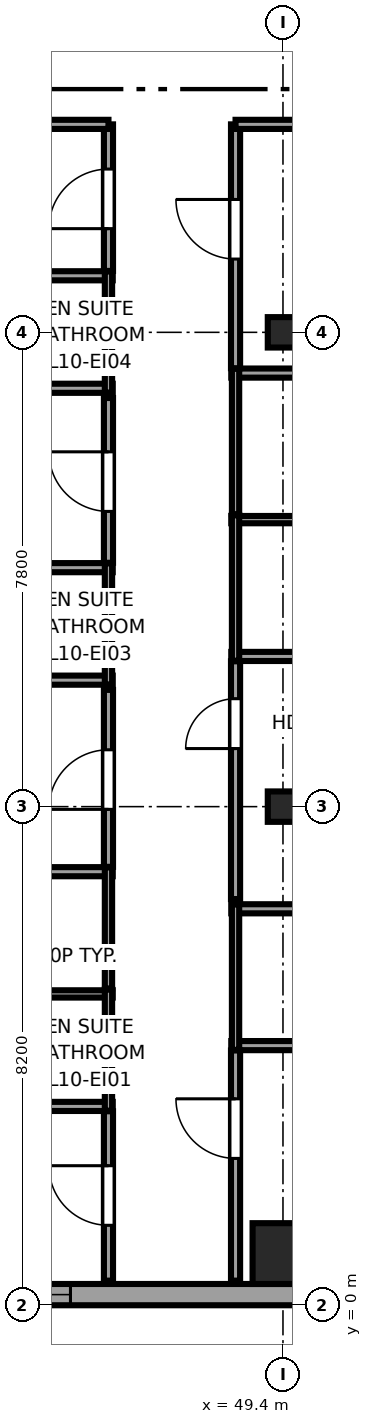
"""IFC4 building model, lengths in metres.
Left out: names, types, materials, properties, quantities, classifications, styles, units other than length and angle.
Written with IfcOpenShell. Run it as: python <this file> out.ifc"""

import sys

from ifc_helpers import new_model, si_unit, direction, frame, frame_2d, origin, origin_2d, place, context, subcontext, project, spatial, rectangle, i_section, extrude, source, transform, mapped, element, fill, save


model = new_model("IFC4")
c1 = context("Model", 3, precision=1e-05, world=origin(), true_north=direction((0.0, 1.0)))
c2 = subcontext(c1, "Body", "Model", "MODEL_VIEW")
j1 = project(units=[si_unit("LENGTHUNIT", "METRE"), si_unit("PLANEANGLEUNIT", "RADIAN")], contexts=[c1])
p1 = place(None, origin())
s1 = spatial("IfcSite", under=j1, at=p1, CompositionType="ELEMENT")
p2 = place(p1, origin())
s2 = spatial("IfcBuilding", under=s1, at=p2, CompositionType="ELEMENT")
p3 = place(p2, frame((0.0, 0.0, 46.2)))
s3 = spatial("IfcBuildingStorey", under=s2, at=p3, CompositionType="ELEMENT", Elevation=46.2)
m1 = source(origin(), c2, "Body", "SweptSolid", [
    extrude(rectangle(XDim=1.0, YDim=1.0, at=origin_2d()), origin(), (0.0, 0.0, 1.0), 3.55),
])
p4 = place(p3, frame((49.4, 0.85, 0.0), z_axis=(0.0, 0.0, 1.0), x_axis=(1.0, 0.0, 0.0)))
e1 = element("IfcColumn", 1, at=p4, inside=s3, PredefinedType="COLUMN", context=c2, shape_type="MappedRepresentation", body=[
    mapped(m1, transform((0.0, 0.0, 0.0), x_axis=(1.0, 0.0, 0.0), y_axis=(0.0, 1.0, 0.0), z_axis=(0.0, 0.0, 1.0), scale=1.0)),
])
m2 = source(origin(), c2, "Body", "SweptSolid", [
    extrude(i_section(OverallWidth=0.5, OverallDepth=0.5, WebThickness=0.028, FlangeThickness=0.045, at=origin_2d()), origin(), (0.0, 0.0, 1.0), 3.55),
])
for number, where, z_axis, x_axis in (
    (2, (49.4, 8.2, 0.0), (0.0, 0.0, 1.0), (1.0, 0.0, 0.0)),
    (3, (49.4, 16.0, 0.0), (0.0, 0.0, 1.0), (1.0, 0.0, 0.0)),
):
    element("IfcColumn", number, at=place(p3, frame(where, z_axis=z_axis, x_axis=x_axis)), inside=s3, PredefinedType="COLUMN", context=c2, shape_type="MappedRepresentation", body=[
        mapped(m2, transform((0.0, 0.0, 0.0), x_axis=(1.0, 0.0, 0.0), y_axis=(0.0, 1.0, 0.0), z_axis=(0.0, 0.0, 1.0), scale=1.0)),
    ])
p5 = place(p3, frame((34.375, 0.175, 0.0), z_axis=(0.0, 0.0, 1.0), x_axis=(1.0, 0.0, 0.0)))
e4 = element("IfcWall", 4, at=p5, inside=s3, PredefinedType="SOLIDWALL", context=c2, shape_type="SweptSolid", body=[
    extrude(rectangle(XDim=18.008, YDim=0.35, at=frame_2d((9.004, 0.0))), origin(), (0.0, 0.0, 1.0), 3.37),
])
p6 = place(p5, frame((1.726, 0.0, 0.68)))
e5 = element("IfcOpeningElement", 5, at=p6, cuts=e4, PredefinedType="OPENING", context=c2, shape_type="SweptSolid", body=[
    extrude(rectangle(XDim=1.95, YDim=1.82, at=frame_2d((0.975, 0.91))), frame((0.0, 0.185, 0.0), z_axis=(0.0, -1.0, 0.0), x_axis=(1.0, 0.0, 0.0)), (0.0, 0.0, 1.0), 0.37),
])
p7 = place(p5, frame((9.58, 0.0, 0.68)))
e6 = element("IfcOpeningElement", 6, at=p7, cuts=e4, PredefinedType="OPENING", context=c2, shape_type="SweptSolid", body=[
    extrude(rectangle(XDim=1.95, YDim=1.82, at=frame_2d((0.975, 0.91))), frame((0.0, 0.185, 0.0), z_axis=(0.0, -1.0, 0.0), x_axis=(1.0, 0.0, 0.0)), (0.0, 0.0, 1.0), 0.37),
])
p8 = place(p5, frame((15.725, 0.0, 0.62)))
e7 = element("IfcOpeningElement", 7, at=p8, cuts=e4, PredefinedType="OPENING", context=c2, shape_type="SweptSolid", body=[
    extrude(rectangle(XDim=1.5, YDim=1.55, at=frame_2d((0.75, 0.775))), frame((0.0, 0.185, 0.0), z_axis=(0.0, -1.0, 0.0), x_axis=(1.0, 0.0, 0.0)), (0.0, 0.0, 1.0), 0.37),
])
p9 = place(p3, frame((44.01, 3.27, 0.0), z_axis=(0.0, 0.0, 1.0), x_axis=(1.0, 0.0, 0.0)))
e8 = element("IfcWall", 8, at=p9, inside=s3, PredefinedType="PARTITIONING", context=c2, shape_type="SweptSolid", body=[
    extrude(rectangle(XDim=2.59, YDim=0.15, at=frame_2d((1.295, 0.0))), origin(), (0.0, 0.0, 1.0), 3.37),
])
p10 = place(p3, frame((44.01, 5.12, 0.0), z_axis=(0.0, 0.0, 1.0), x_axis=(1.0, 0.0, 0.0)))
e9 = element("IfcWall", 9, at=p10, inside=s3, PredefinedType="PLUMBINGWALL", context=c2, shape_type="SweptSolid", body=[
    extrude(rectangle(XDim=2.59, YDim=0.12, at=frame_2d((1.295, 0.0))), origin(), (0.0, 0.0, 1.0), 3.37),
])
p11 = place(p3, frame((46.53, 3.2, 0.0), z_axis=(0.0, 0.0, 1.0), x_axis=(0.0, 1.0, 0.0)))
e10 = element("IfcWall", 10, at=p11, inside=s3, PredefinedType="PLUMBINGWALL", context=c2, shape_type="SweptSolid", body=[
    extrude(rectangle(XDim=1.99, YDim=0.12, at=frame_2d((0.995, 0.0))), origin(), (0.0, 0.0, 1.0), 3.37),
])
p12 = place(p3, frame((44.01, 7.13, 0.0), z_axis=(0.0, 0.0, 1.0), x_axis=(1.0, 0.0, 0.0)))
e11 = element("IfcWall", 11, at=p12, inside=s3, PredefinedType="PARTITIONING", context=c2, shape_type="SweptSolid", body=[
    extrude(rectangle(XDim=2.59, YDim=0.15, at=frame_2d((1.295, 0.0))), origin(), (0.0, 0.0, 1.0), 3.37),
])
p13 = place(p3, frame((46.53, 5.21, 0.0), z_axis=(0.0, 0.0, 1.0), x_axis=(0.0, 1.0, 0.0)))
e12 = element("IfcWall", 12, at=p13, inside=s3, PredefinedType="PLUMBINGWALL", context=c2, shape_type="SweptSolid", body=[
    extrude(rectangle(XDim=1.99, YDim=0.12, at=frame_2d((0.995, 0.0))), origin(), (0.0, 0.0, 1.0), 3.37),
])
p14 = place(p3, frame((34.65, 10.28, 0.0), z_axis=(0.0, 0.0, 1.0), x_axis=(1.0, 0.0, 0.0)))
e13 = element("IfcWall", 13, at=p14, inside=s3, PredefinedType="PARTITIONING", context=c2, shape_type="SweptSolid", body=[
    extrude(rectangle(XDim=11.95, YDim=0.15, at=frame_2d((5.975, 0.0))), origin(), (0.0, 0.0, 1.0), 3.37),
])
p15 = place(p3, frame((44.01, 12.13, 0.0), z_axis=(0.0, 0.0, 1.0), x_axis=(1.0, 0.0, 0.0)))
e14 = element("IfcWall", 14, at=p15, inside=s3, PredefinedType="PARTITIONING", context=c2, shape_type="SweptSolid", body=[
    extrude(rectangle(XDim=2.59, YDim=0.15, at=frame_2d((1.295, 0.0))), origin(), (0.0, 0.0, 1.0), 3.37),
])
p16 = place(p3, frame((46.53, 10.21, 0.0), z_axis=(0.0, 0.0, 1.0), x_axis=(0.0, 1.0, 0.0)))
e15 = element("IfcWall", 15, at=p16, inside=s3, PredefinedType="PLUMBINGWALL", context=c2, shape_type="SweptSolid", body=[
    extrude(rectangle(XDim=1.99, YDim=0.12, at=frame_2d((0.995, 0.0))), origin(), (0.0, 0.0, 1.0), 3.37),
])
p17 = place(p3, frame((34.65, 15.08, 0.0), z_axis=(0.0, 0.0, 1.0), x_axis=(1.0, 0.0, 0.0)))
e16 = element("IfcWall", 16, at=p17, inside=s3, PredefinedType="PARTITIONING", context=c2, shape_type="SweptSolid", body=[
    extrude(rectangle(XDim=11.95, YDim=0.15, at=frame_2d((5.975, 0.0))), origin(), (0.0, 0.0, 1.0), 3.37),
])
p18 = place(p3, frame((44.01, 16.93, 0.0), z_axis=(0.0, 0.0, 1.0), x_axis=(1.0, 0.0, 0.0)))
e17 = element("IfcWall", 17, at=p18, inside=s3, PredefinedType="PARTITIONING", context=c2, shape_type="SweptSolid", body=[
    extrude(rectangle(XDim=2.59, YDim=0.15, at=frame_2d((1.295, 0.0))), origin(), (0.0, 0.0, 1.0), 3.37),
])
p19 = place(p3, frame((46.53, 15.01, 0.0), z_axis=(0.0, 0.0, 1.0), x_axis=(0.0, 1.0, 0.0)))
e18 = element("IfcWall", 18, at=p19, inside=s3, PredefinedType="PLUMBINGWALL", context=c2, shape_type="SweptSolid", body=[
    extrude(rectangle(XDim=1.99, YDim=0.12, at=frame_2d((0.995, 0.0))), origin(), (0.0, 0.0, 1.0), 3.37),
])
for number, where, z_axis, x_axis in (
    (19, (48.55, 4.27, 0.0), (0.0, 0.0, 1.0), (1.0, 0.0, 0.0)),
    (20, (48.55, 6.52, 0.0), (0.0, 0.0, 1.0), (1.0, 0.0, 0.0)),
):
    element("IfcWall", number, at=place(p3, frame(where, z_axis=z_axis, x_axis=x_axis)), inside=s3, PredefinedType="PARTITIONING", context=c2, shape_type="SweptSolid", body=[
        extrude(rectangle(XDim=2.59, YDim=0.15, at=frame_2d((1.295, 0.0))), origin(), (0.0, 0.0, 1.0), 3.37),
    ])
p20 = place(p3, frame((48.62, 4.2, 0.0), z_axis=(0.0, 0.0, 1.0), x_axis=(0.0, 1.0, 0.0)))
e21 = element("IfcWall", 21, at=p20, inside=s3, PredefinedType="PLUMBINGWALL", context=c2, shape_type="SweptSolid", body=[
    extrude(rectangle(XDim=2.39, YDim=0.12, at=frame_2d((1.195, 0.0))), origin(), (0.0, 0.0, 1.0), 3.37),
])
p21 = place(p3, frame((48.55, 10.67, 0.0), z_axis=(0.0, 0.0, 1.0), x_axis=(1.0, 0.0, 0.0)))
e22 = element("IfcWall", 22, at=p21, inside=s3, PredefinedType="PARTITIONING", context=c2, shape_type="SweptSolid", body=[
    extrude(rectangle(XDim=2.59, YDim=0.15, at=frame_2d((1.295, 0.0))), origin(), (0.0, 0.0, 1.0), 3.37),
])
p22 = place(p3, frame((48.55, 12.92, 0.0), z_axis=(0.0, 0.0, 1.0), x_axis=(1.0, 0.0, 0.0)))
e23 = element("IfcWall", 23, at=p22, inside=s3, PredefinedType="PLUMBINGWALL", context=c2, shape_type="SweptSolid", body=[
    extrude(rectangle(XDim=2.59, YDim=0.12, at=frame_2d((1.295, 0.0))), origin(), (0.0, 0.0, 1.0), 3.37),
])
p23 = place(p3, frame((48.62, 10.6, 0.0), z_axis=(0.0, 0.0, 1.0), x_axis=(0.0, 1.0, 0.0)))
e24 = element("IfcWall", 24, at=p23, inside=s3, PredefinedType="PLUMBINGWALL", context=c2, shape_type="SweptSolid", body=[
    extrude(rectangle(XDim=2.39, YDim=0.12, at=frame_2d((1.195, 0.0))), origin(), (0.0, 0.0, 1.0), 3.37),
])
p24 = place(p3, frame((48.55, 15.33, 0.0), z_axis=(0.0, 0.0, 1.0), x_axis=(1.0, 0.0, 0.0)))
e25 = element("IfcWall", 25, at=p24, inside=s3, PredefinedType="PARTITIONING", context=c2, shape_type="SweptSolid", body=[
    extrude(rectangle(XDim=2.59, YDim=0.15, at=frame_2d((1.295, 0.0))), origin(), (0.0, 0.0, 1.0), 3.37),
])
p25 = place(p3, frame((48.62, 13.01, 0.0), z_axis=(0.0, 0.0, 1.0), x_axis=(0.0, 1.0, 0.0)))
e26 = element("IfcWall", 26, at=p25, inside=s3, PredefinedType="PLUMBINGWALL", context=c2, shape_type="SweptSolid", body=[
    extrude(rectangle(XDim=2.39, YDim=0.12, at=frame_2d((1.195, 0.0))), origin(), (0.0, 0.0, 1.0), 3.37),
])
p26 = place(p3, frame((46.53, 0.405, 0.0), z_axis=(0.0, 0.0, 1.0), x_axis=(0.0, 1.0, 0.0)))
e27 = element("IfcWall", 27, at=p26, inside=s3, PredefinedType="PARTITIONING", context=c2, shape_type="SweptSolid", body=[
    extrude(rectangle(XDim=2.785, YDim=0.15, at=frame_2d((1.393, 0.0))), origin(), (0.0, 0.0, 1.0), 3.37),
])
p27 = place(p26, frame((0.91, 0.0, 0.0)))
e28 = element("IfcOpeningElement", 28, at=p27, cuts=e27, PredefinedType="OPENING", context=c2, shape_type="SweptSolid", body=[
    extrude(rectangle(XDim=0.98, YDim=2.12, at=frame_2d((0.49, 1.06))), frame((0.0, 0.085, 0.0), z_axis=(0.0, -1.0, 0.0), x_axis=(1.0, 0.0, 0.0)), (0.0, 0.0, 1.0), 0.17),
])
p28 = place(p3, frame((46.53, 7.21, 0.0), z_axis=(0.0, 0.0, 1.0), x_axis=(0.0, 1.0, 0.0)))
e29 = element("IfcWall", 29, at=p28, inside=s3, PredefinedType="PARTITIONING", context=c2, shape_type="SweptSolid", body=[
    extrude(rectangle(XDim=2.91, YDim=0.15, at=frame_2d((1.455, 0.0))), origin(), (0.0, 0.0, 1.0), 3.37),
])
p29 = place(p28, frame((0.945, 0.0, 0.0)))
e30 = element("IfcOpeningElement", 30, at=p29, cuts=e29, PredefinedType="OPENING", context=c2, shape_type="SweptSolid", body=[
    extrude(rectangle(XDim=0.98, YDim=2.12, at=frame_2d((0.49, 1.06))), frame((0.0, 0.085, 0.0), z_axis=(0.0, -1.0, 0.0), x_axis=(1.0, 0.0, 0.0)), (0.0, 0.0, 1.0), 0.17),
])
p30 = place(p3, frame((46.53, 12.21, 0.0), z_axis=(0.0, 0.0, 1.0), x_axis=(0.0, 1.0, 0.0)))
e31 = element("IfcWall", 31, at=p30, inside=s3, PredefinedType="PARTITIONING", context=c2, shape_type="SweptSolid", body=[
    extrude(rectangle(XDim=2.71, YDim=0.15, at=frame_2d((1.355, 0.0))), origin(), (0.0, 0.0, 1.0), 3.37),
])
p31 = place(p30, frame((0.845, 0.0, 0.0)))
e32 = element("IfcOpeningElement", 32, at=p31, cuts=e31, PredefinedType="OPENING", context=c2, shape_type="SweptSolid", body=[
    extrude(rectangle(XDim=0.98, YDim=2.12, at=frame_2d((0.49, 1.06))), frame((0.0, 0.085, 0.0), z_axis=(0.0, -1.0, 0.0), x_axis=(1.0, 0.0, 0.0)), (0.0, 0.0, 1.0), 0.17),
])
p32 = place(p3, frame((46.53, 17.01, 0.0), z_axis=(0.0, 0.0, 1.0), x_axis=(0.0, 1.0, 0.0)))
e33 = element("IfcWall", 33, at=p32, inside=s3, PredefinedType="PARTITIONING", context=c2, shape_type="SweptSolid", body=[
    extrude(rectangle(XDim=2.41, YDim=0.15, at=frame_2d((1.205, 0.0))), origin(), (0.0, 0.0, 1.0), 3.37),
])
p33 = place(p32, frame((0.695, 0.0, 0.0)))
e34 = element("IfcOpeningElement", 34, at=p33, cuts=e33, PredefinedType="OPENING", context=c2, shape_type="SweptSolid", body=[
    extrude(rectangle(XDim=0.98, YDim=2.12, at=frame_2d((0.49, 1.06))), frame((0.0, 0.085, 0.0), z_axis=(0.0, -1.0, 0.0), x_axis=(1.0, 0.0, 0.0)), (0.0, 0.0, 1.0), 0.17),
])
p34 = place(p3, frame((34.65, 19.42, 0.0), z_axis=(0.0, 0.0, 1.0), x_axis=(1.0, 0.0, 0.0)))
e35 = element("IfcWall", 35, at=p34, inside=s3, PredefinedType="PARTITIONING", context=c2, shape_type="SweptSolid", body=[
    extrude(rectangle(XDim=11.88, YDim=0.15, at=frame_2d((5.94, 0.0))), origin(), (0.0, 0.0, 1.0), 3.37),
])
p35 = place(p3, frame((48.62, 0.405, 0.0), z_axis=(0.0, 0.0, 1.0), x_axis=(0.0, 1.0, 0.0)))
e36 = element("IfcWall", 36, at=p35, inside=s3, PredefinedType="PARTITIONING", context=c2, shape_type="SweptSolid", body=[
    extrude(rectangle(XDim=3.785, YDim=0.15, at=frame_2d((1.893, 0.0))), origin(), (0.0, 0.0, 1.0), 3.37),
])
p36 = place(p35, frame((2.01, 0.0, 0.0)))
e37 = element("IfcOpeningElement", 37, at=p36, cuts=e36, PredefinedType="OPENING", context=c2, shape_type="SweptSolid", body=[
    extrude(rectangle(XDim=0.98, YDim=2.12, at=frame_2d((0.49, 1.06))), frame((0.0, 0.085, 0.0), z_axis=(0.0, -1.0, 0.0), x_axis=(1.0, 0.0, 0.0)), (0.0, 0.0, 1.0), 0.17),
])
p37 = place(p3, frame((48.62, 6.68, 0.0), z_axis=(0.0, 0.0, 1.0), x_axis=(0.0, 1.0, 0.0)))
e38 = element("IfcWall", 38, at=p37, inside=s3, PredefinedType="PARTITIONING", context=c2, shape_type="SweptSolid", body=[
    extrude(rectangle(XDim=3.91, YDim=0.15, at=frame_2d((1.955, 0.0))), origin(), (0.0, 0.0, 1.0), 3.37),
])
p38 = place(p37, frame((2.475, 0.0, 0.0)))
e39 = element("IfcOpeningElement", 39, at=p38, cuts=e38, PredefinedType="OPENING", context=c2, shape_type="SweptSolid", body=[
    extrude(rectangle(XDim=0.82, YDim=2.01, at=frame_2d((0.41, 1.005))), frame((0.0, 0.085, 0.0), z_axis=(0.0, -1.0, 0.0), x_axis=(1.0, 0.0, 0.0)), (0.0, 0.0, 1.0), 0.17),
])
p39 = place(p3, frame((48.62, 15.41, 0.0), z_axis=(0.0, 0.0, 1.0), x_axis=(0.0, 1.0, 0.0)))
e40 = element("IfcWall", 40, at=p39, inside=s3, PredefinedType="PARTITIONING", context=c2, shape_type="SweptSolid", body=[
    extrude(rectangle(XDim=4.01, YDim=0.15, at=frame_2d((2.005, 0.0))), origin(), (0.0, 0.0, 1.0), 3.37),
])
p40 = place(p39, frame((1.795, 0.0, 0.0)))
e41 = element("IfcOpeningElement", 41, at=p40, cuts=e40, PredefinedType="OPENING", context=c2, shape_type="SweptSolid", body=[
    extrude(rectangle(XDim=0.98, YDim=2.12, at=frame_2d((0.49, 1.06))), frame((0.0, 0.085, 0.0), z_axis=(0.0, -1.0, 0.0), x_axis=(1.0, 0.0, 0.0)), (0.0, 0.0, 1.0), 0.17),
])
p41 = place(p3, frame((48.62, 19.42, 0.0), z_axis=(0.0, 0.0, 1.0), x_axis=(1.0, 0.0, 0.0)))
e42 = element("IfcWall", 42, at=p41, inside=s3, PredefinedType="PARTITIONING", context=c2, shape_type="SweptSolid", body=[
    extrude(rectangle(XDim=7.975, YDim=0.15, at=frame_2d((3.987, 0.0))), origin(), (0.0, 0.0, 1.0), 3.37),
])
m3 = source(origin(), c2, "Body", "SweptSolid", [
    extrude(rectangle(XDim=1.95, YDim=1.82, at=frame_2d((0.975, 0.91))), frame((0.0, 0.09, 0.0), z_axis=(0.0, -1.0, 0.0), x_axis=(1.0, 0.0, 0.0)), (0.0, 0.0, 1.0), 0.06),
])
p42 = place(p7, origin())
e43 = element("IfcWindow", 43, at=p42, inside=s3, PartitioningType="DOUBLE_PANEL_VERTICAL", PredefinedType="WINDOW", context=c2, shape_type="MappedRepresentation", body=[
    mapped(m3, transform((0.0, 0.0, 0.0), x_axis=(1.0, 0.0, 0.0), y_axis=(0.0, 1.0, 0.0), z_axis=(0.0, 0.0, 1.0), scale=1.0)),
])
fill(e6, e43)
m4 = source(origin(), c2, "Body", "SweptSolid", [
    extrude(rectangle(XDim=0.98, YDim=2.12, at=frame_2d((0.49, 1.06))), frame((0.0, 0.025, 0.0), z_axis=(0.0, -1.0, 0.0), x_axis=(1.0, 0.0, 0.0)), (0.0, 0.0, 1.0), 0.05),
])
p43 = place(p27, origin())
e44 = element("IfcDoor", 44, at=p43, inside=s3, OperationType="SINGLE_SWING_RIGHT", PredefinedType="DOOR", context=c2, shape_type="MappedRepresentation", body=[
    mapped(m4, transform((0.0, 0.0, 0.0), x_axis=(1.0, 0.0, 0.0), y_axis=(0.0, 1.0, 0.0), z_axis=(0.0, 0.0, 1.0), scale=1.0)),
])
fill(e28, e44)
p44 = place(p29, origin())
e45 = element("IfcDoor", 45, at=p44, inside=s3, OperationType="SINGLE_SWING_LEFT", PredefinedType="DOOR", context=c2, shape_type="MappedRepresentation", body=[
    mapped(m4, transform((0.0, 0.0, 0.0), x_axis=(1.0, 0.0, 0.0), y_axis=(0.0, 1.0, 0.0), z_axis=(0.0, 0.0, 1.0), scale=1.0)),
])
fill(e30, e45)
p45 = place(p31, origin())
e46 = element("IfcDoor", 46, at=p45, inside=s3, OperationType="SINGLE_SWING_RIGHT", PredefinedType="DOOR", context=c2, shape_type="MappedRepresentation", body=[
    mapped(m4, transform((0.0, 0.0, 0.0), x_axis=(1.0, 0.0, 0.0), y_axis=(0.0, 1.0, 0.0), z_axis=(0.0, 0.0, 1.0), scale=1.0)),
])
fill(e32, e46)
p46 = place(p33, origin())
e47 = element("IfcDoor", 47, at=p46, inside=s3, OperationType="SINGLE_SWING_LEFT", PredefinedType="DOOR", context=c2, shape_type="MappedRepresentation", body=[
    mapped(m4, transform((0.0, 0.0, 0.0), x_axis=(1.0, 0.0, 0.0), y_axis=(0.0, 1.0, 0.0), z_axis=(0.0, 0.0, 1.0), scale=1.0)),
])
fill(e34, e47)
p47 = place(p36, origin())
e48 = element("IfcDoor", 48, at=p47, inside=s3, OperationType="SINGLE_SWING_RIGHT", PredefinedType="DOOR", context=c2, shape_type="MappedRepresentation", body=[
    mapped(m4, transform((0.0, 0.0, 0.0), x_axis=(1.0, 0.0, 0.0), y_axis=(0.0, 1.0, 0.0), z_axis=(0.0, 0.0, 1.0), scale=1.0)),
])
fill(e37, e48)
m5 = source(origin(), c2, "Body", "SweptSolid", [
    extrude(rectangle(XDim=0.82, YDim=2.01, at=frame_2d((0.41, 1.005))), frame((0.0, 0.025, 0.0), z_axis=(0.0, -1.0, 0.0), x_axis=(1.0, 0.0, 0.0)), (0.0, 0.0, 1.0), 0.05),
])
p48 = place(p38, origin())
e49 = element("IfcDoor", 49, at=p48, inside=s3, OperationType="SINGLE_SWING_LEFT", PredefinedType="DOOR", context=c2, shape_type="MappedRepresentation", body=[
    mapped(m5, transform((0.0, 0.0, 0.0), x_axis=(1.0, 0.0, 0.0), y_axis=(0.0, 1.0, 0.0), z_axis=(0.0, 0.0, 1.0), scale=1.0)),
])
fill(e39, e49)
p49 = place(p40, origin())
e50 = element("IfcDoor", 50, at=p49, inside=s3, OperationType="SINGLE_SWING_RIGHT", PredefinedType="DOOR", context=c2, shape_type="MappedRepresentation", body=[
    mapped(m4, transform((0.0, 0.0, 0.0), x_axis=(1.0, 0.0, 0.0), y_axis=(0.0, 1.0, 0.0), z_axis=(0.0, 0.0, 1.0), scale=1.0)),
])
fill(e41, e50)
save(model, sys.argv[1])
